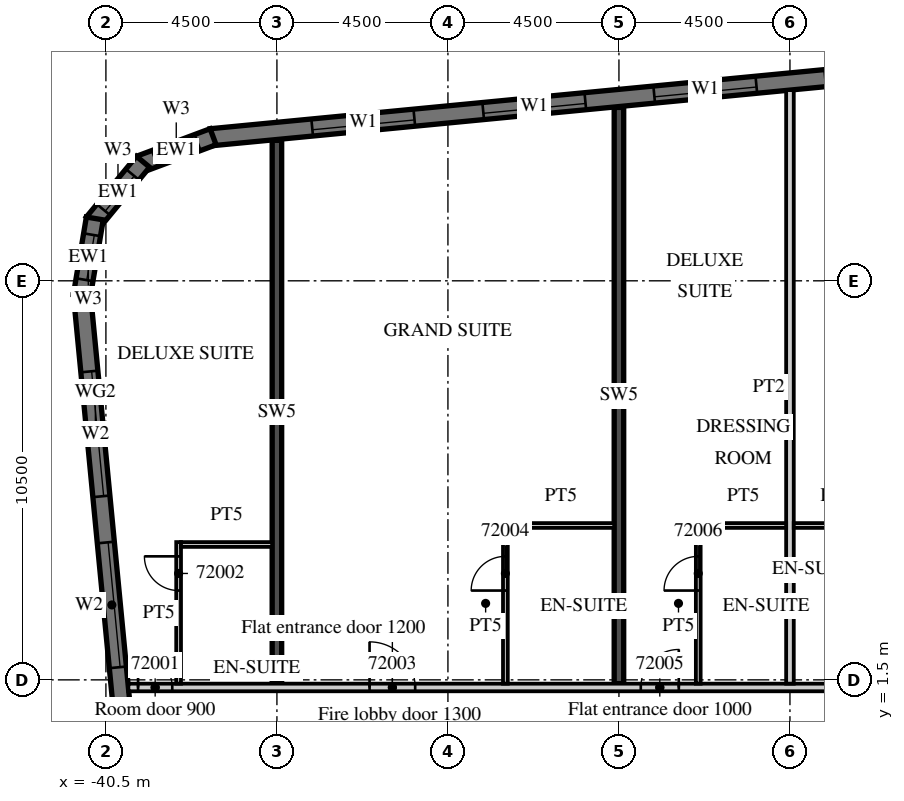
"""IFC4 building model, lengths in metres.
Left out: names, types, materials, properties, quantities, classifications, styles, units other than length and angle.
Written with IfcOpenShell. Run it as: python <this file> out.ifc"""

import sys

from ifc_helpers import new_model, si_unit, direction, frame, frame_2d, origin, place, context, subcontext, project, spatial, polyline, rectangle, outline, extrude, element, fill, save


model = new_model("IFC4")
c1 = context("Model", 3, precision=1e-05, world=origin(), true_north=direction((0.0, 1.0)))
c2 = subcontext(c1, "Body", "Model", "MODEL_VIEW")
j1 = project(units=[si_unit("LENGTHUNIT", "METRE"), si_unit("PLANEANGLEUNIT", "RADIAN")], contexts=[c1])
p1 = place(None, origin())
s1 = spatial("IfcSite", under=j1, at=p1, CompositionType="ELEMENT")
p2 = place(p1, origin())
s2 = spatial("IfcBuilding", under=s1, at=p2, CompositionType="ELEMENT")
p3 = place(p2, frame((0.0, 0.0, 288.3)))
s3 = spatial("IfcBuildingStorey", under=s2, at=p3, CompositionType="ELEMENT", Elevation=288.3)
p4 = place(p3, frame((-36.0, 1.4, 0.0), z_axis=(0.0, 0.0, 1.0), x_axis=(0.0, 1.0, 0.0)))
e1 = element("IfcWall", 1, at=p4, inside=s3, PredefinedType="SHEAR", context=c2, shape_type="SweptSolid", body=[
    extrude(rectangle(XDim=14.296, YDim=0.25, at=frame_2d((7.148, 0.0))), origin(), (0.0, 0.0, 1.0), 3.3),
])
p5 = place(p3, frame((-27.0, 1.4, 0.0), z_axis=(0.0, 0.0, 1.0), x_axis=(0.0, 1.0, 0.0)))
e2 = element("IfcWall", 2, at=p5, inside=s3, PredefinedType="SHEAR", context=c2, shape_type="SweptSolid", body=[
    extrude(rectangle(XDim=15.163, YDim=0.25, at=frame_2d((7.582, 0.0))), origin(), (0.0, 0.0, 1.0), 3.3),
])
p6 = place(p3, frame((-41.132, 11.658, 0.0), z_axis=(0.0, 0.0, 1.0), x_axis=(0.095847749461, -0.995396006082, 0.0)))
e3 = element("IfcWall", 3, at=p6, inside=s3, PredefinedType="SOLIDWALL", context=c2, shape_type="SweptSolid", body=[
    extrude(rectangle(XDim=32.0, YDim=0.45, at=frame_2d((16.0, 0.0))), origin(), (0.0, 0.0, 1.0), 3.02),
])
p7 = place(p6, frame((2.053, 0.0, 0.45)))
e4 = element("IfcOpeningElement", 4, at=p7, cuts=e3, PredefinedType="OPENING", context=c2, shape_type="SweptSolid", body=[
    extrude(rectangle(XDim=3.3, YDim=2.25, at=frame_2d((1.65, 1.125))), frame((0.0, 0.235, 0.0), z_axis=(0.0, -1.0, 0.0), x_axis=(1.0, 0.0, 0.0)), (0.0, 0.0, 1.0), 0.47),
])
p8 = place(p6, frame((6.574, 0.0, 0.45)))
e5 = element("IfcOpeningElement", 5, at=p8, cuts=e3, PredefinedType="OPENING", context=c2, shape_type="SweptSolid", body=[
    extrude(rectangle(XDim=3.3, YDim=2.25, at=frame_2d((1.65, 1.125))), frame((0.0, 0.235, 0.0), z_axis=(0.0, -1.0, 0.0), x_axis=(1.0, 0.0, 0.0)), (0.0, 0.0, 1.0), 0.47),
])
p9 = place(p3, frame((13.521, 20.713, 0.0), z_axis=(0.0, 0.0, 1.0), x_axis=(-0.995396277313, -0.095844932638, 0.0)))
e6 = element("IfcWall", 6, at=p9, inside=s3, PredefinedType="SOLIDWALL", context=c2, shape_type="SweptSolid", body=[
    extrude(rectangle(XDim=51.495, YDim=0.45, at=frame_2d((25.748, 0.0))), origin(), (0.0, 0.0, 1.0), 3.02),
])
p10 = place(p9, frame((0.91, 0.0, 0.45)))
e7 = element("IfcOpeningElement", 7, at=p10, cuts=e6, PredefinedType="OPENING", context=c2, shape_type="SweptSolid", body=[
    extrude(rectangle(XDim=2.7, YDim=2.25, at=frame_2d((1.35, 1.125))), frame((0.0, 0.235, 0.0), z_axis=(0.0, -1.0, 0.0), x_axis=(1.0, 0.0, 0.0)), (0.0, 0.0, 1.0), 0.47),
])
p11 = place(p9, frame((5.431, 0.0, 0.45)))
e8 = element("IfcOpeningElement", 8, at=p11, cuts=e6, PredefinedType="OPENING", context=c2, shape_type="SweptSolid", body=[
    extrude(rectangle(XDim=2.7, YDim=2.25, at=frame_2d((1.35, 1.125))), frame((0.0, 0.235, 0.0), z_axis=(0.0, -1.0, 0.0), x_axis=(1.0, 0.0, 0.0)), (0.0, 0.0, 1.0), 0.47),
])
p12 = place(p9, frame((9.952, 0.0, 0.45)))
e9 = element("IfcOpeningElement", 9, at=p12, cuts=e6, PredefinedType="OPENING", context=c2, shape_type="SweptSolid", body=[
    extrude(rectangle(XDim=2.7, YDim=2.25, at=frame_2d((1.35, 1.125))), frame((0.0, 0.235, 0.0), z_axis=(0.0, -1.0, 0.0), x_axis=(1.0, 0.0, 0.0)), (0.0, 0.0, 1.0), 0.47),
])
p13 = place(p9, frame((14.473, 0.0, 0.45)))
e10 = element("IfcOpeningElement", 10, at=p13, cuts=e6, PredefinedType="OPENING", context=c2, shape_type="SweptSolid", body=[
    extrude(rectangle(XDim=2.7, YDim=2.25, at=frame_2d((1.35, 1.125))), frame((0.0, 0.235, 0.0), z_axis=(0.0, -1.0, 0.0), x_axis=(1.0, 0.0, 0.0)), (0.0, 0.0, 1.0), 0.47),
])
p14 = place(p9, frame((18.994, 0.0, 0.45)))
e11 = element("IfcOpeningElement", 11, at=p14, cuts=e6, PredefinedType="OPENING", context=c2, shape_type="SweptSolid", body=[
    extrude(rectangle(XDim=2.7, YDim=2.25, at=frame_2d((1.35, 1.125))), frame((0.0, 0.235, 0.0), z_axis=(0.0, -1.0, 0.0), x_axis=(1.0, 0.0, 0.0)), (0.0, 0.0, 1.0), 0.47),
])
p15 = place(p9, frame((23.514, 0.0, 0.45)))
e12 = element("IfcOpeningElement", 12, at=p15, cuts=e6, PredefinedType="OPENING", context=c2, shape_type="SweptSolid", body=[
    extrude(rectangle(XDim=2.7, YDim=2.25, at=frame_2d((1.35, 1.125))), frame((0.0, 0.235, 0.0), z_axis=(0.0, -1.0, 0.0), x_axis=(1.0, 0.0, 0.0)), (0.0, 0.0, 1.0), 0.47),
])
p16 = place(p9, frame((28.035, 0.0, 0.45)))
e13 = element("IfcOpeningElement", 13, at=p16, cuts=e6, PredefinedType="OPENING", context=c2, shape_type="SweptSolid", body=[
    extrude(rectangle(XDim=2.7, YDim=2.25, at=frame_2d((1.35, 1.125))), frame((0.0, 0.235, 0.0), z_axis=(0.0, -1.0, 0.0), x_axis=(1.0, 0.0, 0.0)), (0.0, 0.0, 1.0), 0.47),
])
p17 = place(p9, frame((32.556, 0.0, 0.45)))
e14 = element("IfcOpeningElement", 14, at=p17, cuts=e6, PredefinedType="OPENING", context=c2, shape_type="SweptSolid", body=[
    extrude(rectangle(XDim=2.7, YDim=2.25, at=frame_2d((1.35, 1.125))), frame((0.0, 0.235, 0.0), z_axis=(0.0, -1.0, 0.0), x_axis=(1.0, 0.0, 0.0)), (0.0, 0.0, 1.0), 0.47),
])
p18 = place(p9, frame((37.077, 0.0, 0.45)))
e15 = element("IfcOpeningElement", 15, at=p18, cuts=e6, PredefinedType="OPENING", context=c2, shape_type="SweptSolid", body=[
    extrude(rectangle(XDim=2.7, YDim=2.25, at=frame_2d((1.35, 1.125))), frame((0.0, 0.235, 0.0), z_axis=(0.0, -1.0, 0.0), x_axis=(1.0, 0.0, 0.0)), (0.0, 0.0, 1.0), 0.47),
])
p19 = place(p9, frame((41.598, 0.0, 0.45)))
e16 = element("IfcOpeningElement", 16, at=p19, cuts=e6, PredefinedType="OPENING", context=c2, shape_type="SweptSolid", body=[
    extrude(rectangle(XDim=2.7, YDim=2.25, at=frame_2d((1.35, 1.125))), frame((0.0, 0.235, 0.0), z_axis=(0.0, -1.0, 0.0), x_axis=(1.0, 0.0, 0.0)), (0.0, 0.0, 1.0), 0.47),
])
p20 = place(p9, frame((46.118, 0.0, 0.45)))
e17 = element("IfcOpeningElement", 17, at=p20, cuts=e6, PredefinedType="OPENING", context=c2, shape_type="SweptSolid", body=[
    extrude(rectangle(XDim=2.7, YDim=2.25, at=frame_2d((1.35, 1.125))), frame((0.0, 0.235, 0.0), z_axis=(0.0, -1.0, 0.0), x_axis=(1.0, 0.0, 0.0)), (0.0, 0.0, 1.0), 0.47),
])
p21 = place(p3, frame((-37.679, 15.791, 0.0), z_axis=(0.0, 0.0, 1.0), x_axis=(-0.936677599948, -0.350192909346, 0.0)))
e18 = element("IfcWall", 18, at=p21, inside=s3, PredefinedType="SOLIDWALL", context=c2, shape_type="SweptSolid", body=[
    extrude(outline(polyline([(0.0, -0.225), (2.071, -0.225), (1.95, 0.225), (0.121, 0.225), (0.0, -0.225)])), origin(), (0.0, 0.0, 1.0), 3.02),
])
p22 = place(p21, frame((0.435, 0.0, 0.45)))
e19 = element("IfcOpeningElement", 19, at=p22, cuts=e18, PredefinedType="OPENING", context=c2, shape_type="SweptSolid", body=[
    extrude(rectangle(XDim=1.2, YDim=2.25, at=frame_2d((0.6, 1.125))), frame((0.0, 0.235, 0.0), z_axis=(0.0, -1.0, 0.0), x_axis=(1.0, 0.0, 0.0)), (0.0, 0.0, 1.0), 0.47),
])
p23 = place(p3, frame((-39.524, 15.133, 0.0), z_axis=(0.0, 0.0, 1.0), x_axis=(-0.636046112757, -0.771651049663, 0.0)))
e20 = element("IfcWall", 20, at=p23, inside=s3, PredefinedType="SOLIDWALL", context=c2, shape_type="SweptSolid", body=[
    extrude(outline(polyline([(0.0, -0.225), (2.071, -0.225), (1.95, 0.225), (0.121, 0.225), (0.0, -0.225)])), origin(), (0.0, 0.0, 1.0), 3.02),
])
p24 = place(p23, frame((0.435, 0.0, 0.45)))
e21 = element("IfcOpeningElement", 21, at=p24, cuts=e20, PredefinedType="OPENING", context=c2, shape_type="SweptSolid", body=[
    extrude(rectangle(XDim=1.2, YDim=2.25, at=frame_2d((0.6, 1.125))), frame((0.0, 0.235, 0.0), z_axis=(0.0, -1.0, 0.0), x_axis=(1.0, 0.0, 0.0)), (0.0, 0.0, 1.0), 0.47),
])
p25 = place(p3, frame((-40.792, 13.641, 0.0), z_axis=(0.0, 0.0, 1.0), x_axis=(-0.165068144653, -0.986282164302, 0.0)))
e22 = element("IfcWall", 22, at=p25, inside=s3, PredefinedType="SOLIDWALL", context=c2, shape_type="SweptSolid", body=[
    extrude(outline(polyline([(0.0, -0.225), (2.071, -0.225), (1.95, 0.225), (0.121, 0.225), (0.0, -0.225)])), origin(), (0.0, 0.0, 1.0), 3.02),
])
p26 = place(p25, frame((0.435, 0.0, 0.45)))
e23 = element("IfcOpeningElement", 23, at=p26, cuts=e22, PredefinedType="OPENING", context=c2, shape_type="SweptSolid", body=[
    extrude(rectangle(XDim=1.2, YDim=2.25, at=frame_2d((0.6, 1.125))), frame((0.0, 0.235, 0.0), z_axis=(0.0, -1.0, 0.0), x_axis=(1.0, 0.0, 0.0)), (0.0, 0.0, 1.0), 0.47),
])
p27 = place(p3, frame((-39.909, 1.3, 0.0), z_axis=(0.0, 0.0, 1.0), x_axis=(1.0, 0.0, 0.0)))
e24 = element("IfcWall", 24, at=p27, inside=s3, PredefinedType="PARTITIONING", context=c2, shape_type="SweptSolid", body=[
    extrude(rectangle(XDim=53.409, YDim=0.2, at=frame_2d((26.705, 0.0))), origin(), (0.0, 0.0, 1.0), 3.02),
])
p28 = place(p27, frame((0.255, 0.0, 0.0)))
e25 = element("IfcOpeningElement", 25, at=p28, cuts=e24, PredefinedType="OPENING", context=c2, shape_type="SweptSolid", body=[
    extrude(rectangle(XDim=0.9, YDim=2.1, at=frame_2d((0.45, 1.05))), frame((0.0, 0.11, 0.0), z_axis=(0.0, -1.0, 0.0), x_axis=(1.0, 0.0, 0.0)), (0.0, 0.0, 1.0), 0.22),
])
p29 = place(p27, frame((6.347, 0.0, 0.0)))
e26 = element("IfcOpeningElement", 26, at=p29, cuts=e24, PredefinedType="OPENING", context=c2, shape_type="SweptSolid", body=[
    extrude(rectangle(XDim=1.2, YDim=2.1, at=frame_2d((0.6, 1.05))), frame((0.0, 0.11, 0.0), z_axis=(0.0, -1.0, 0.0), x_axis=(1.0, 0.0, 0.0)), (0.0, 0.0, 1.0), 0.22),
])
p30 = place(p27, frame((13.484, 0.0, 0.0)))
e27 = element("IfcOpeningElement", 27, at=p30, cuts=e24, PredefinedType="OPENING", context=c2, shape_type="SweptSolid", body=[
    extrude(rectangle(XDim=1.0, YDim=2.1, at=frame_2d((0.5, 1.05))), frame((0.0, 0.11, 0.0), z_axis=(0.0, -1.0, 0.0), x_axis=(1.0, 0.0, 0.0)), (0.0, 0.0, 1.0), 0.22),
])
p31 = place(p27, frame((20.334, 0.0, 0.0)))
e28 = element("IfcOpeningElement", 28, at=p31, cuts=e24, PredefinedType="OPENING", context=c2, shape_type="SweptSolid", body=[
    extrude(rectangle(XDim=1.0, YDim=2.1, at=frame_2d((0.5, 1.05))), frame((0.0, 0.11, 0.0), z_axis=(0.0, -1.0, 0.0), x_axis=(1.0, 0.0, 0.0)), (0.0, 0.0, 1.0), 0.22),
])
p32 = place(p27, frame((22.484, 0.0, 0.0)))
e29 = element("IfcOpeningElement", 29, at=p32, cuts=e24, PredefinedType="OPENING", context=c2, shape_type="SweptSolid", body=[
    extrude(rectangle(XDim=1.0, YDim=2.1, at=frame_2d((0.5, 1.05))), frame((0.0, 0.11, 0.0), z_axis=(0.0, -1.0, 0.0), x_axis=(1.0, 0.0, 0.0)), (0.0, 0.0, 1.0), 0.22),
])
p33 = place(p27, frame((26.959, 0.0, 0.0)))
e30 = element("IfcOpeningElement", 30, at=p33, cuts=e24, PredefinedType="OPENING", context=c2, shape_type="SweptSolid", body=[
    extrude(rectangle(XDim=1.0, YDim=2.1, at=frame_2d((0.5, 1.05))), frame((0.0, 0.11, 0.0), z_axis=(0.0, -1.0, 0.0), x_axis=(1.0, 0.0, 0.0)), (0.0, 0.0, 1.0), 0.22),
])
p34 = place(p27, frame((36.271, 0.0, 0.0)))
e31 = element("IfcOpeningElement", 31, at=p34, cuts=e24, PredefinedType="OPENING", context=c2, shape_type="SweptSolid", body=[
    extrude(rectangle(XDim=1.2, YDim=2.1, at=frame_2d((0.6, 1.05))), frame((0.0, 0.11, 0.0), z_axis=(0.0, -1.0, 0.0), x_axis=(1.0, 0.0, 0.0)), (0.0, 0.0, 1.0), 0.22),
])
p35 = place(p27, frame((40.484, 0.0, 0.0)))
e32 = element("IfcOpeningElement", 32, at=p35, cuts=e24, PredefinedType="OPENING", context=c2, shape_type="SweptSolid", body=[
    extrude(rectangle(XDim=1.0, YDim=2.1, at=frame_2d((0.5, 1.05))), frame((0.0, 0.11, 0.0), z_axis=(0.0, -1.0, 0.0), x_axis=(1.0, 0.0, 0.0)), (0.0, 0.0, 1.0), 0.22),
])
p36 = place(p27, frame((44.959, 0.0, 0.0)))
e33 = element("IfcOpeningElement", 33, at=p36, cuts=e24, PredefinedType="OPENING", context=c2, shape_type="SweptSolid", body=[
    extrude(rectangle(XDim=1.0, YDim=2.1, at=frame_2d((0.5, 1.05))), frame((0.0, 0.11, 0.0), z_axis=(0.0, -1.0, 0.0), x_axis=(1.0, 0.0, 0.0)), (0.0, 0.0, 1.0), 0.22),
])
p37 = place(p27, frame((51.834, 0.0, 0.0)))
e34 = element("IfcOpeningElement", 34, at=p37, cuts=e24, PredefinedType="OPENING", context=c2, shape_type="SweptSolid", body=[
    extrude(rectangle(XDim=1.0, YDim=2.1, at=frame_2d((0.5, 1.05))), frame((0.0, 0.11, 0.0), z_axis=(0.0, -1.0, 0.0), x_axis=(1.0, 0.0, 0.0)), (0.0, 0.0, 1.0), 0.22),
])
p38 = place(p3, frame((-38.587, 1.4, 0.0), z_axis=(0.0, 0.0, 1.0), x_axis=(0.0, 1.0, 0.0)))
e35 = element("IfcWall", 35, at=p38, inside=s3, PredefinedType="PARTITIONING", context=c2, shape_type="SweptSolid", body=[
    extrude(rectangle(XDim=3.725, YDim=0.125, at=frame_2d((1.863, 0.0))), origin(), (0.0, 0.0, 1.0), 3.02),
])
p39 = place(p38, frame((2.45, 0.0, 0.0)))
e36 = element("IfcOpeningElement", 36, at=p39, cuts=e35, PredefinedType="OPENING", context=c2, shape_type="SweptSolid", body=[
    extrude(rectangle(XDim=0.9, YDim=2.1, at=frame_2d((0.45, 1.05))), frame((0.0, 0.073, 0.0), z_axis=(0.0, -1.0, 0.0), x_axis=(1.0, 0.0, 0.0)), (0.0, 0.0, 1.0), 0.145),
])
p40 = place(p3, frame((-38.525, 5.062, 0.0), z_axis=(0.0, 0.0, 1.0), x_axis=(1.0, 0.0, 0.0)))
e37 = element("IfcWall", 37, at=p40, inside=s3, PredefinedType="PARTITIONING", context=c2, shape_type="SweptSolid", body=[
    extrude(rectangle(XDim=2.4, YDim=0.125, at=frame_2d((1.2, 0.0))), origin(), (0.0, 0.0, 1.0), 3.02),
])
p41 = place(p3, frame((-29.988, 1.4, 0.0), z_axis=(0.0, 0.0, 1.0), x_axis=(0.0, 1.0, 0.0)))
e38 = element("IfcWall", 38, at=p41, inside=s3, PredefinedType="PARTITIONING", context=c2, shape_type="SweptSolid", body=[
    extrude(rectangle(XDim=4.225, YDim=0.125, at=frame_2d((2.113, 0.0))), origin(), (0.0, 0.0, 1.0), 3.02),
])
p42 = place(p41, frame((2.45, 0.0, 0.0)))
e39 = element("IfcOpeningElement", 39, at=p42, cuts=e38, PredefinedType="OPENING", context=c2, shape_type="SweptSolid", body=[
    extrude(rectangle(XDim=0.9, YDim=2.1, at=frame_2d((0.45, 1.05))), frame((0.0, 0.073, 0.0), z_axis=(0.0, -1.0, 0.0), x_axis=(1.0, 0.0, 0.0)), (0.0, 0.0, 1.0), 0.145),
])
p43 = place(p3, frame((-29.925, 5.562, 0.0), z_axis=(0.0, 0.0, 1.0), x_axis=(1.0, 0.0, 0.0)))
e40 = element("IfcWall", 40, at=p43, inside=s3, PredefinedType="PARTITIONING", context=c2, shape_type="SweptSolid", body=[
    extrude(rectangle(XDim=2.8, YDim=0.125, at=frame_2d((1.4, 0.0))), origin(), (0.0, 0.0, 1.0), 3.02),
])
p44 = place(p3, frame((-22.5, 1.4, 0.0), z_axis=(0.0, 0.0, 1.0), x_axis=(0.0, 1.0, 0.0)))
e41 = element("IfcWall", 41, at=p44, inside=s3, PredefinedType="PARTITIONING", context=c2, shape_type="SweptSolid", body=[
    extrude(rectangle(XDim=15.618, YDim=0.2, at=frame_2d((7.809, 0.0))), origin(), (0.0, 0.0, 1.0), 3.02),
])
p45 = place(p3, frame((-24.913, 1.4, 0.0), z_axis=(0.0, 0.0, 1.0), x_axis=(0.0, 1.0, 0.0)))
e42 = element("IfcWall", 42, at=p45, inside=s3, PredefinedType="PARTITIONING", context=c2, shape_type="SweptSolid", body=[
    extrude(rectangle(XDim=4.225, YDim=0.125, at=frame_2d((2.113, 0.0))), origin(), (0.0, 0.0, 1.0), 3.02),
])
p46 = place(p45, frame((2.45, 0.0, 0.0)))
e43 = element("IfcOpeningElement", 43, at=p46, cuts=e42, PredefinedType="OPENING", context=c2, shape_type="SweptSolid", body=[
    extrude(rectangle(XDim=0.9, YDim=2.1, at=frame_2d((0.45, 1.05))), frame((0.0, 0.073, 0.0), z_axis=(0.0, -1.0, 0.0), x_axis=(1.0, 0.0, 0.0)), (0.0, 0.0, 1.0), 0.145),
])
for number, where, z_axis, x_axis in (
    (44, (-24.85, 5.562, 0.0), (0.0, 0.0, 1.0), (1.0, 0.0, 0.0)),
    (45, (-22.4, 5.562, 0.0), (0.0, 0.0, 1.0), (1.0, 0.0, 0.0)),
):
    element("IfcWall", number, at=place(p3, frame(where, z_axis=z_axis, x_axis=x_axis)), inside=s3, PredefinedType="PARTITIONING", context=c2, shape_type="SweptSolid", body=[
        extrude(rectangle(XDim=2.25, YDim=0.125, at=frame_2d((1.125, 0.0))), origin(), (0.0, 0.0, 1.0), 3.02),
    ])
p47 = place(p7, origin())
e46 = element("IfcWindow", 46, at=p47, inside=s3, PartitioningType="SINGLE_PANEL", PredefinedType="WINDOW", context=c2, shape_type="SweptSolid", body=[
    extrude(rectangle(XDim=3.3, YDim=2.25, at=frame_2d((1.65, 1.125))), frame((0.0, 0.09, 0.0), z_axis=(0.0, -1.0, 0.0), x_axis=(1.0, 0.0, 0.0)), (0.0, 0.0, 1.0), 0.06),
])
fill(e4, e46)
p48 = place(p8, origin())
e47 = element("IfcWindow", 47, at=p48, inside=s3, PartitioningType="SINGLE_PANEL", PredefinedType="WINDOW", context=c2, shape_type="SweptSolid", body=[
    extrude(rectangle(XDim=3.3, YDim=2.25, at=frame_2d((1.65, 1.125))), frame((0.0, 0.09, 0.0), z_axis=(0.0, -1.0, 0.0), x_axis=(1.0, 0.0, 0.0)), (0.0, 0.0, 1.0), 0.06),
])
fill(e5, e47)
p49 = place(p18, origin())
e48 = element("IfcWindow", 48, at=p49, inside=s3, PartitioningType="SINGLE_PANEL", PredefinedType="WINDOW", context=c2, shape_type="SweptSolid", body=[
    extrude(rectangle(XDim=2.7, YDim=2.25, at=frame_2d((1.35, 1.125))), frame((0.0, 0.09, 0.0), z_axis=(0.0, -1.0, 0.0), x_axis=(1.0, 0.0, 0.0)), (0.0, 0.0, 1.0), 0.06),
])
fill(e15, e48)
p50 = place(p19, origin())
e49 = element("IfcWindow", 49, at=p50, inside=s3, PartitioningType="SINGLE_PANEL", PredefinedType="WINDOW", context=c2, shape_type="SweptSolid", body=[
    extrude(rectangle(XDim=2.7, YDim=2.25, at=frame_2d((1.35, 1.125))), frame((0.0, 0.09, 0.0), z_axis=(0.0, -1.0, 0.0), x_axis=(1.0, 0.0, 0.0)), (0.0, 0.0, 1.0), 0.06),
])
fill(e16, e49)
p51 = place(p20, origin())
e50 = element("IfcWindow", 50, at=p51, inside=s3, PartitioningType="SINGLE_PANEL", PredefinedType="WINDOW", context=c2, shape_type="SweptSolid", body=[
    extrude(rectangle(XDim=2.7, YDim=2.25, at=frame_2d((1.35, 1.125))), frame((0.0, 0.09, 0.0), z_axis=(0.0, -1.0, 0.0), x_axis=(1.0, 0.0, 0.0)), (0.0, 0.0, 1.0), 0.06),
])
fill(e17, e50)
p52 = place(p22, origin())
e51 = element("IfcWindow", 51, at=p52, inside=s3, PartitioningType="SINGLE_PANEL", PredefinedType="WINDOW", context=c2, shape_type="SweptSolid", body=[
    extrude(rectangle(XDim=1.2, YDim=2.25, at=frame_2d((0.6, 1.125))), frame((0.0, 0.09, 0.0), z_axis=(0.0, -1.0, 0.0), x_axis=(1.0, 0.0, 0.0)), (0.0, 0.0, 1.0), 0.06),
])
fill(e19, e51)
p53 = place(p24, origin())
e52 = element("IfcWindow", 52, at=p53, inside=s3, PartitioningType="SINGLE_PANEL", PredefinedType="WINDOW", context=c2, shape_type="SweptSolid", body=[
    extrude(rectangle(XDim=1.2, YDim=2.25, at=frame_2d((0.6, 1.125))), frame((0.0, 0.09, 0.0), z_axis=(0.0, -1.0, 0.0), x_axis=(1.0, 0.0, 0.0)), (0.0, 0.0, 1.0), 0.06),
])
fill(e21, e52)
p54 = place(p26, origin())
e53 = element("IfcWindow", 53, at=p54, inside=s3, PartitioningType="SINGLE_PANEL", PredefinedType="WINDOW", context=c2, shape_type="SweptSolid", body=[
    extrude(rectangle(XDim=1.2, YDim=2.25, at=frame_2d((0.6, 1.125))), frame((0.0, 0.09, 0.0), z_axis=(0.0, -1.0, 0.0), x_axis=(1.0, 0.0, 0.0)), (0.0, 0.0, 1.0), 0.06),
])
fill(e23, e53)
p55 = place(p28, origin())
e54 = element("IfcDoor", 54, at=p55, inside=s3, OperationType="SINGLE_SWING_LEFT", PredefinedType="DOOR", context=c2, shape_type="SweptSolid", body=[
    extrude(rectangle(XDim=0.9, YDim=2.1, at=frame_2d((0.45, 1.05))), frame((0.0, 0.025, 0.0), z_axis=(0.0, -1.0, 0.0), x_axis=(1.0, 0.0, 0.0)), (0.0, 0.0, 1.0), 0.05),
])
fill(e25, e54)
p56 = place(p39, origin())
e55 = element("IfcDoor", 55, at=p56, inside=s3, OperationType="SINGLE_SWING_RIGHT", PredefinedType="DOOR", context=c2, shape_type="SweptSolid", body=[
    extrude(rectangle(XDim=0.9, YDim=2.1, at=frame_2d((0.45, 1.05))), frame((0.0, 0.025, 0.0), z_axis=(0.0, -1.0, 0.0), x_axis=(1.0, 0.0, 0.0)), (0.0, 0.0, 1.0), 0.05),
])
fill(e36, e55)
p57 = place(p29, origin())
e56 = element("IfcDoor", 56, at=p57, inside=s3, OperationType="SINGLE_SWING_LEFT", PredefinedType="DOOR", context=c2, shape_type="SweptSolid", body=[
    extrude(rectangle(XDim=1.2, YDim=2.1, at=frame_2d((0.6, 1.05))), frame((0.0, 0.025, 0.0), z_axis=(0.0, -1.0, 0.0), x_axis=(1.0, 0.0, 0.0)), (0.0, 0.0, 1.0), 0.05),
])
fill(e26, e56)
p58 = place(p42, origin())
e57 = element("IfcDoor", 57, at=p58, inside=s3, OperationType="SINGLE_SWING_LEFT", PredefinedType="DOOR", context=c2, shape_type="SweptSolid", body=[
    extrude(rectangle(XDim=0.9, YDim=2.1, at=frame_2d((0.45, 1.05))), frame((0.0, 0.025, 0.0), z_axis=(0.0, -1.0, 0.0), x_axis=(1.0, 0.0, 0.0)), (0.0, 0.0, 1.0), 0.05),
])
fill(e39, e57)
p59 = place(p30, origin())
e58 = element("IfcDoor", 58, at=p59, inside=s3, OperationType="SINGLE_SWING_RIGHT", PredefinedType="DOOR", context=c2, shape_type="SweptSolid", body=[
    extrude(rectangle(XDim=1.0, YDim=2.1, at=frame_2d((0.5, 1.05))), frame((0.0, 0.025, 0.0), z_axis=(0.0, -1.0, 0.0), x_axis=(1.0, 0.0, 0.0)), (0.0, 0.0, 1.0), 0.05),
])
fill(e27, e58)
p60 = place(p46, origin())
e59 = element("IfcDoor", 59, at=p60, inside=s3, OperationType="SINGLE_SWING_LEFT", PredefinedType="DOOR", context=c2, shape_type="SweptSolid", body=[
    extrude(rectangle(XDim=0.9, YDim=2.1, at=frame_2d((0.45, 1.05))), frame((0.0, 0.025, 0.0), z_axis=(0.0, -1.0, 0.0), x_axis=(1.0, 0.0, 0.0)), (0.0, 0.0, 1.0), 0.05),
])
fill(e43, e59)
save(model, sys.argv[1])
